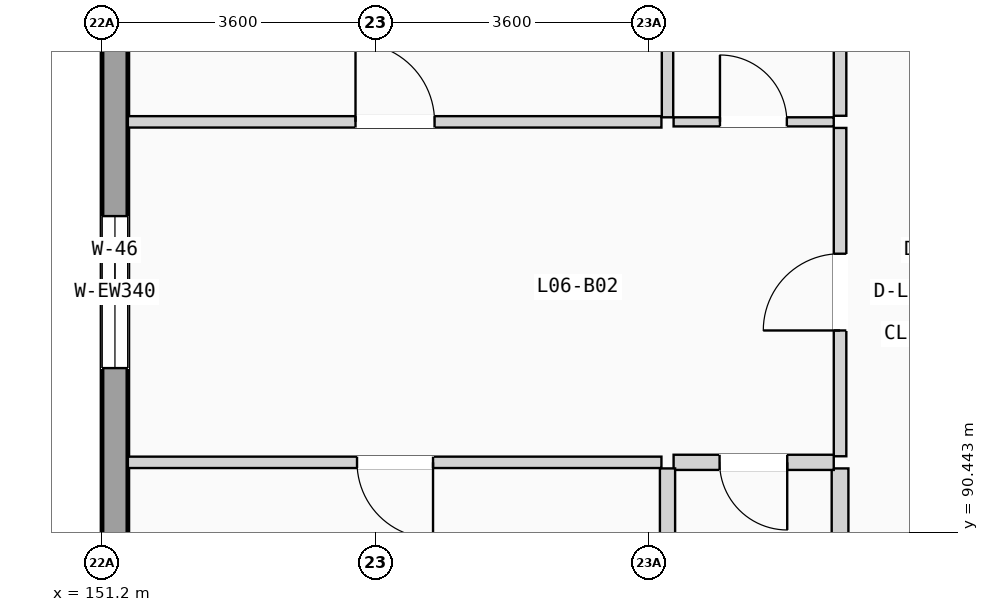
"""IFC4 building model, lengths in metres.
Left out: names, types, materials, properties, quantities, classifications, styles, units other than length and angle.
Written with IfcOpenShell. Run it as: python <this file> out.ifc"""

import sys

from ifc_helpers import new_model, si_unit, direction, frame, frame_2d, origin, place, context, subcontext, project, spatial, rectangle, extrude, element, fill, save


model = new_model("IFC4")
c1 = context("Model", 3, precision=1e-05, world=origin(), true_north=direction((0.0, 1.0)))
c2 = subcontext(c1, "Body", "Model", "MODEL_VIEW")
j1 = project(units=[si_unit("LENGTHUNIT", "METRE"), si_unit("PLANEANGLEUNIT", "RADIAN")], contexts=[c1])
p1 = place(None, origin())
s1 = spatial("IfcSite", under=j1, at=p1, CompositionType="ELEMENT")
p2 = place(p1, origin())
s2 = spatial("IfcBuilding", under=s1, at=p2, CompositionType="ELEMENT")
p3 = place(p2, frame((0.0, 0.0, 21.525)))
s3 = spatial("IfcBuildingStorey", under=s2, at=p3, CompositionType="ELEMENT", Elevation=21.525)
p4 = place(p3, frame((151.37, 68.74, 0.0), z_axis=(0.0, 0.0, 1.0), x_axis=(0.0, 1.0, 0.0)))
e1 = element("IfcWall", 1, at=p4, inside=s3, PredefinedType="SOLIDWALL", context=c2, shape_type="SweptSolid", body=[
    extrude(rectangle(XDim=49.72, YDim=0.34, at=frame_2d((24.86, 0.0))), origin(), (0.0, 0.0, 1.0), 2.89),
])
p5 = place(p4, frame((11.462, 0.0, 0.0)))
e2 = element("IfcOpeningElement", 2, at=p5, cuts=e1, PredefinedType="OPENING", context=c2, shape_type="SweptSolid", body=[
    extrude(rectangle(XDim=0.95, YDim=2.15, at=frame_2d((0.475, 1.075))), frame((0.0, 0.18, 0.0), z_axis=(0.0, -1.0, 0.0), x_axis=(1.0, 0.0, 0.0)), (0.0, 0.0, 1.0), 0.36),
])
p6 = place(p4, frame((8.082, 0.0, 0.555)))
e3 = element("IfcOpeningElement", 3, at=p6, cuts=e1, PredefinedType="OPENING", context=c2, shape_type="SweptSolid", body=[
    extrude(rectangle(XDim=1.85, YDim=1.65, at=frame_2d((0.925, 0.825))), frame((0.0, 0.18, 0.0), z_axis=(0.0, -1.0, 0.0), x_axis=(1.0, 0.0, 0.0)), (0.0, 0.0, 1.0), 0.36),
])
p7 = place(p4, frame((16.565, 0.0, 0.85)))
e4 = element("IfcOpeningElement", 4, at=p7, cuts=e1, PredefinedType="OPENING", context=c2, shape_type="SweptSolid", body=[
    extrude(rectangle(XDim=0.95, YDim=1.2, at=frame_2d((0.475, 0.6))), frame((0.0, 0.18, 0.0), z_axis=(0.0, -1.0, 0.0), x_axis=(1.0, 0.0, 0.0)), (0.0, 0.0, 1.0), 0.36),
])
p8 = place(p4, frame((23.86, 0.0, 0.9)))
e5 = element("IfcOpeningElement", 5, at=p8, cuts=e1, PredefinedType="OPENING", context=c2, shape_type="SweptSolid", body=[
    extrude(rectangle(XDim=2.0, YDim=1.2, at=frame_2d((1.0, 0.6))), frame((0.0, 0.18, 0.0), z_axis=(0.0, -1.0, 0.0), x_axis=(1.0, 0.0, 0.0)), (0.0, 0.0, 1.0), 0.36),
])
p9 = place(p4, frame((19.503, 0.0, 0.85)))
e6 = element("IfcOpeningElement", 6, at=p9, cuts=e1, PredefinedType="OPENING", context=c2, shape_type="SweptSolid", body=[
    extrude(rectangle(XDim=0.95, YDim=1.2, at=frame_2d((0.475, 0.6))), frame((0.0, 0.18, 0.0), z_axis=(0.0, -1.0, 0.0), x_axis=(1.0, 0.0, 0.0)), (0.0, 0.0, 1.0), 0.36),
])
p10 = place(p4, frame((29.267, 0.0, 0.85)))
e7 = element("IfcOpeningElement", 7, at=p10, cuts=e1, PredefinedType="OPENING", context=c2, shape_type="SweptSolid", body=[
    extrude(rectangle(XDim=0.95, YDim=1.2, at=frame_2d((0.475, 0.6))), frame((0.0, 0.18, 0.0), z_axis=(0.0, -1.0, 0.0), x_axis=(1.0, 0.0, 0.0)), (0.0, 0.0, 1.0), 0.36),
])
p11 = place(p4, frame((37.243, 0.0, 0.0)))
e8 = element("IfcOpeningElement", 8, at=p11, cuts=e1, PredefinedType="OPENING", context=c2, shape_type="SweptSolid", body=[
    extrude(rectangle(XDim=1.08, YDim=2.18, at=frame_2d((0.54, 1.09))), frame((0.0, 0.18, 0.0), z_axis=(0.0, -1.0, 0.0), x_axis=(1.0, 0.0, 0.0)), (0.0, 0.0, 1.0), 0.36),
])
p12 = place(p4, frame((31.681, 0.0, 0.555)))
e9 = element("IfcOpeningElement", 9, at=p12, cuts=e1, PredefinedType="OPENING", context=c2, shape_type="SweptSolid", body=[
    extrude(rectangle(XDim=2.0, YDim=1.65, at=frame_2d((1.0, 0.825))), frame((0.0, 0.18, 0.0), z_axis=(0.0, -1.0, 0.0), x_axis=(1.0, 0.0, 0.0)), (0.0, 0.0, 1.0), 0.36),
])
p13 = place(p4, frame((40.239, 0.0, 0.85)))
e10 = element("IfcOpeningElement", 10, at=p13, cuts=e1, PredefinedType="OPENING", context=c2, shape_type="SweptSolid", body=[
    extrude(rectangle(XDim=0.95, YDim=1.2, at=frame_2d((0.475, 0.6))), frame((0.0, 0.18, 0.0), z_axis=(0.0, -1.0, 0.0), x_axis=(1.0, 0.0, 0.0)), (0.0, 0.0, 1.0), 0.36),
])
p14 = place(p3, frame((160.91, 91.44, 0.0), z_axis=(0.0, 0.0, 1.0), x_axis=(0.0, 1.0, 0.0)))
e11 = element("IfcWall", 11, at=p14, inside=s3, PredefinedType="PARTITIONING", context=c2, shape_type="SweptSolid", body=[
    extrude(rectangle(XDim=4.32, YDim=0.165, at=frame_2d((2.16, 0.0))), origin(), (0.0, 0.0, 1.0), 2.87),
])
p15 = place(p14, frame((1.655, 0.0, 0.0)))
e12 = element("IfcOpeningElement", 12, at=p15, cuts=e11, PredefinedType="OPENING", context=c2, shape_type="SweptSolid", body=[
    extrude(rectangle(XDim=1.01, YDim=2.11, at=frame_2d((0.505, 1.055))), frame((0.0, 0.093, 0.0), z_axis=(0.0, -1.0, 0.0), x_axis=(1.0, 0.0, 0.0)), (0.0, 0.0, 1.0), 0.185),
])
p16 = place(p3, frame((160.91, 87.706, 0.0), z_axis=(0.0, 0.0, 1.0), x_axis=(0.0, 1.0, 0.0)))
e13 = element("IfcWall", 13, at=p16, inside=s3, PredefinedType="PLUMBINGWALL", context=c2, shape_type="SweptSolid", body=[
    extrude(rectangle(XDim=3.574, YDim=0.22, at=frame_2d((1.787, 0.0))), origin(), (0.0, 0.0, 1.0), 2.87),
])
p17 = place(p3, frame((160.91, 95.92, 0.0), z_axis=(0.0, 0.0, 1.0), x_axis=(0.0, 1.0, 0.0)))
e14 = element("IfcWall", 14, at=p17, inside=s3, PredefinedType="PARTITIONING", context=c2, shape_type="SweptSolid", body=[
    extrude(rectangle(XDim=3.574, YDim=0.165, at=frame_2d((1.787, 0.0))), origin(), (0.0, 0.0, 1.0), 2.87),
])
p18 = place(p3, frame((158.72, 91.36, 0.0), z_axis=(0.0, 0.0, 1.0), x_axis=(1.0, 0.0, 0.0)))
e15 = element("IfcWall", 15, at=p18, inside=s3, PredefinedType="PLUMBINGWALL", context=c2, shape_type="SweptSolid", body=[
    extrude(rectangle(XDim=2.107, YDim=0.2, at=frame_2d((1.053, 0.0))), origin(), (0.0, 0.0, 1.0), 2.87),
])
p19 = place(p18, frame((0.605, 0.0, 0.0)))
e16 = element("IfcOpeningElement", 16, at=p19, cuts=e15, PredefinedType="OPENING", context=c2, shape_type="SweptSolid", body=[
    extrude(rectangle(XDim=0.89, YDim=2.03, at=frame_2d((0.445, 1.015))), frame((0.0, 0.11, 0.0), z_axis=(0.0, -1.0, 0.0), x_axis=(1.0, 0.0, 0.0)), (0.0, 0.0, 1.0), 0.22),
])
p20 = place(p3, frame((158.72, 95.84, 0.0), z_axis=(0.0, 0.0, 1.0), x_axis=(1.0, 0.0, 0.0)))
e17 = element("IfcWall", 17, at=p20, inside=s3, PredefinedType="PARTITIONING", context=c2, shape_type="SweptSolid", body=[
    extrude(rectangle(XDim=2.107, YDim=0.12, at=frame_2d((1.053, 0.0))), origin(), (0.0, 0.0, 1.0), 2.87),
])
p21 = place(p20, frame((0.61, 0.0, 0.0)))
e18 = element("IfcOpeningElement", 18, at=p21, cuts=e17, PredefinedType="OPENING", context=c2, shape_type="SweptSolid", body=[
    extrude(rectangle(XDim=0.88, YDim=2.02, at=frame_2d((0.44, 1.01))), frame((0.0, 0.07, 0.0), z_axis=(0.0, -1.0, 0.0), x_axis=(1.0, 0.0, 0.0)), (0.0, 0.0, 1.0), 0.14),
])
p22 = place(p3, frame((151.54, 91.36, 0.0), z_axis=(0.0, 0.0, 1.0), x_axis=(1.0, 0.0, 0.0)))
e19 = element("IfcWall", 19, at=p22, inside=s3, PredefinedType="PARTITIONING", context=c2, shape_type="SweptSolid", body=[
    extrude(rectangle(XDim=7.02, YDim=0.15, at=frame_2d((3.51, 0.0))), origin(), (0.0, 0.0, 1.0), 2.87),
])
p23 = place(p22, frame((3.015, 0.0, 0.0)))
e20 = element("IfcOpeningElement", 20, at=p23, cuts=e19, PredefinedType="OPENING", context=c2, shape_type="SweptSolid", body=[
    extrude(rectangle(XDim=1.0, YDim=2.06, at=frame_2d((0.5, 1.03))), frame((0.0, 0.085, 0.0), z_axis=(0.0, -1.0, 0.0), x_axis=(1.0, 0.0, 0.0)), (0.0, 0.0, 1.0), 0.17),
])
p24 = place(p3, frame((151.54, 95.84, 0.0), z_axis=(0.0, 0.0, 1.0), x_axis=(1.0, 0.0, 0.0)))
e21 = element("IfcWall", 21, at=p24, inside=s3, PredefinedType="PARTITIONING", context=c2, shape_type="SweptSolid", body=[
    extrude(rectangle(XDim=7.02, YDim=0.15, at=frame_2d((3.51, 0.0))), origin(), (0.0, 0.0, 1.0), 2.87),
])
p25 = place(p24, frame((2.995, 0.0, 0.0)))
e22 = element("IfcOpeningElement", 22, at=p25, cuts=e21, PredefinedType="OPENING", context=c2, shape_type="SweptSolid", body=[
    extrude(rectangle(XDim=1.04, YDim=2.08, at=frame_2d((0.52, 1.04))), frame((0.0, 0.085, 0.0), z_axis=(0.0, -1.0, 0.0), x_axis=(1.0, 0.0, 0.0)), (0.0, 0.0, 1.0), 0.17),
])
p26 = place(p3, frame((158.64, 87.706, 0.0), z_axis=(0.0, 0.0, 1.0), x_axis=(0.0, 1.0, 0.0)))
e23 = element("IfcWall", 23, at=p26, inside=s3, PredefinedType="PLUMBINGWALL", context=c2, shape_type="SweptSolid", body=[
    extrude(rectangle(XDim=3.574, YDim=0.2, at=frame_2d((1.787, 0.0))), origin(), (0.0, 0.0, 1.0), 2.87),
])
p27 = place(p3, frame((158.64, 95.9, 0.0), z_axis=(0.0, 0.0, 1.0), x_axis=(0.0, 1.0, 0.0)))
e24 = element("IfcWall", 24, at=p27, inside=s3, PredefinedType="PARTITIONING", context=c2, shape_type="SweptSolid", body=[
    extrude(rectangle(XDim=3.594, YDim=0.15, at=frame_2d((1.797, 0.0))), origin(), (0.0, 0.0, 1.0), 2.87),
])
p28 = place(p8, origin())
e25 = element("IfcWindow", 25, at=p28, inside=s3, PartitioningType="DOUBLE_PANEL_VERTICAL", PredefinedType="WINDOW", context=c2, shape_type="SweptSolid", body=[
    extrude(rectangle(XDim=2.0, YDim=1.2, at=frame_2d((1.0, 0.6))), frame((0.0, 0.03, 0.0), z_axis=(0.0, -1.0, 0.0), x_axis=(1.0, 0.0, 0.0)), (0.0, 0.0, 1.0), 0.06),
])
fill(e5, e25)
p29 = place(p15, origin())
e26 = element("IfcDoor", 26, at=p29, inside=s3, OperationType="SINGLE_SWING_LEFT", PredefinedType="DOOR", context=c2, shape_type="SweptSolid", body=[
    extrude(rectangle(XDim=1.01, YDim=2.11, at=frame_2d((0.505, 1.055))), frame((0.0, 0.025, 0.0), z_axis=(0.0, -1.0, 0.0), x_axis=(1.0, 0.0, 0.0)), (0.0, 0.0, 1.0), 0.05),
])
fill(e12, e26)
p30 = place(p19, frame((0.89, 0.0, 0.0), z_axis=(0.0, 0.0, 1.0), x_axis=(-1.0, 0.0, 0.0)))
e27 = element("IfcDoor", 27, at=p30, inside=s3, OperationType="SINGLE_SWING_RIGHT", PredefinedType="DOOR", context=c2, shape_type="SweptSolid", body=[
    extrude(rectangle(XDim=0.89, YDim=2.03, at=frame_2d((0.445, 1.015))), frame((0.0, 0.025, 0.0), z_axis=(0.0, -1.0, 0.0), x_axis=(1.0, 0.0, 0.0)), (0.0, 0.0, 1.0), 0.05),
])
fill(e16, e27)
p31 = place(p21, origin())
e28 = element("IfcDoor", 28, at=p31, inside=s3, OperationType="SINGLE_SWING_LEFT", PredefinedType="DOOR", context=c2, shape_type="SweptSolid", body=[
    extrude(rectangle(XDim=0.88, YDim=2.02, at=frame_2d((0.44, 1.01))), frame((0.0, 0.025, 0.0), z_axis=(0.0, -1.0, 0.0), x_axis=(1.0, 0.0, 0.0)), (0.0, 0.0, 1.0), 0.05),
])
fill(e18, e28)
p32 = place(p23, frame((1.0, 0.0, 0.0), z_axis=(0.0, 0.0, 1.0), x_axis=(-1.0, 0.0, 0.0)))
e29 = element("IfcDoor", 29, at=p32, inside=s3, OperationType="SINGLE_SWING_RIGHT", PredefinedType="DOOR", context=c2, shape_type="SweptSolid", body=[
    extrude(rectangle(XDim=1.0, YDim=2.06, at=frame_2d((0.5, 1.03))), frame((0.0, 0.025, 0.0), z_axis=(0.0, -1.0, 0.0), x_axis=(1.0, 0.0, 0.0)), (0.0, 0.0, 1.0), 0.05),
])
fill(e20, e29)
p33 = place(p25, origin())
e30 = element("IfcDoor", 30, at=p33, inside=s3, OperationType="SINGLE_SWING_LEFT", PredefinedType="DOOR", context=c2, shape_type="SweptSolid", body=[
    extrude(rectangle(XDim=1.04, YDim=2.08, at=frame_2d((0.52, 1.04))), frame((0.0, 0.025, 0.0), z_axis=(0.0, -1.0, 0.0), x_axis=(1.0, 0.0, 0.0)), (0.0, 0.0, 1.0), 0.05),
])
fill(e22, e30)
save(model, sys.argv[1])
